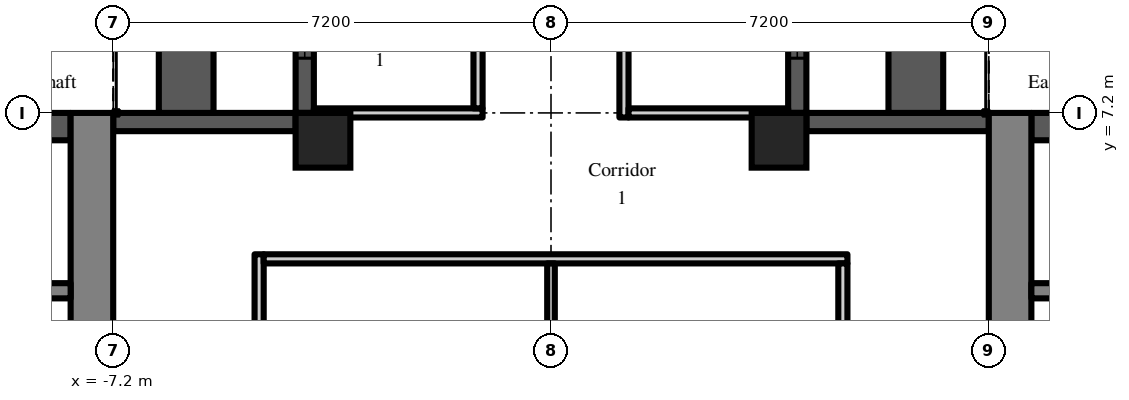
"""IFC4 building model, lengths in metres.
Left out: names, types, materials, properties, quantities, classifications, styles, units other than length and angle.
Written with IfcOpenShell. Run it as: python <this file> out.ifc"""

import sys

from ifc_helpers import new_model, si_unit, direction, frame, frame_2d, origin, origin_2d, place, context, subcontext, project, spatial, rectangle, extrude, element, fill, save


model = new_model("IFC4")
c1 = context("Model", 3, precision=1e-05, world=origin(), true_north=direction((0.0, 1.0)))
c2 = subcontext(c1, "Body", "Model", "MODEL_VIEW")
j1 = project(units=[si_unit("LENGTHUNIT", "METRE"), si_unit("PLANEANGLEUNIT", "RADIAN")], contexts=[c1])
p1 = place(None, origin())
s1 = spatial("IfcSite", under=j1, at=p1, CompositionType="ELEMENT")
p2 = place(p1, origin())
s2 = spatial("IfcBuilding", under=s1, at=p2, CompositionType="ELEMENT")
p3 = place(p2, frame((0.0, 0.0, 159.3)))
s3 = spatial("IfcBuildingStorey", under=s2, at=p3, CompositionType="ELEMENT", Elevation=159.3)
for number, where, z_axis, x_axis in (
    (1, (-3.75, 6.75, 0.0), (0.0, 0.0, 1.0), (1.0, 0.0, 0.0)),
    (2, (3.75, 6.75, 0.0), (0.0, 0.0, 1.0), (1.0, 0.0, 0.0)),
):
    element("IfcColumn", number, at=place(p3, frame(where, z_axis=z_axis, x_axis=x_axis)), inside=s3, PredefinedType="COLUMN", context=c2, shape_type="SweptSolid", body=[
        extrude(rectangle(XDim=0.9, YDim=0.9, at=origin_2d()), origin(), (0.0, 0.0, 1.0), 3.0),
    ])
p4 = place(p3, frame((7.2, 7.05, 0.0), z_axis=(0.0, 0.0, 1.0), x_axis=(-1.0, 0.0, 0.0)))
e3 = element("IfcWall", 3, at=p4, inside=s3, PredefinedType="SOLIDWALL", context=c2, shape_type="SweptSolid", body=[
    extrude(rectangle(XDim=3.0, YDim=0.3, at=frame_2d((1.5, 0.0))), origin(), (0.0, 0.0, 1.0), 2.55),
])
p5 = place(p3, frame((4.05, 7.2, 0.0), z_axis=(0.0, 0.0, 1.0), x_axis=(0.0, 1.0, 0.0)))
e4 = element("IfcWall", 4, at=p5, inside=s3, PredefinedType="SOLIDWALL", context=c2, shape_type="SweptSolid", body=[
    extrude(rectangle(XDim=7.2, YDim=0.3, at=frame_2d((3.6, 0.0))), origin(), (0.0, 0.0, 1.0), 2.55),
])
p6 = place(p5, frame((3.0, 0.0, 0.0)))
e5 = element("IfcOpeningElement", 5, at=p6, cuts=e4, PredefinedType="OPENING", context=c2, shape_type="SweptSolid", body=[
    extrude(rectangle(XDim=1.2, YDim=2.05, at=frame_2d((0.6, 1.025))), frame((0.0, 0.16, 0.0), z_axis=(0.0, -1.0, 0.0), x_axis=(1.0, 0.0, 0.0)), (0.0, 0.0, 1.0), 0.32),
])
p7 = place(p5, frame((0.9, 0.0, 0.2)))
e6 = element("IfcOpeningElement", 6, at=p7, cuts=e4, PredefinedType="OPENING", context=c2, shape_type="SweptSolid", body=[
    extrude(rectangle(XDim=1.8, YDim=1.85, at=frame_2d((0.9, 0.925))), frame((0.0, 0.16, 0.0), z_axis=(0.0, -1.0, 0.0), x_axis=(1.0, 0.0, 0.0)), (0.0, 0.0, 1.0), 0.32),
])
p8 = place(p5, frame((4.5, 0.0, 0.2)))
e7 = element("IfcOpeningElement", 7, at=p8, cuts=e4, PredefinedType="OPENING", context=c2, shape_type="SweptSolid", body=[
    extrude(rectangle(XDim=1.8, YDim=1.85, at=frame_2d((0.9, 0.925))), frame((0.0, 0.16, 0.0), z_axis=(0.0, -1.0, 0.0), x_axis=(1.0, 0.0, 0.0)), (0.0, 0.0, 1.0), 0.32),
])
p9 = place(p3, frame((-4.05, 14.4, 0.0), z_axis=(0.0, 0.0, 1.0), x_axis=(0.0, -1.0, 0.0)))
e8 = element("IfcWall", 8, at=p9, inside=s3, PredefinedType="SOLIDWALL", context=c2, shape_type="SweptSolid", body=[
    extrude(rectangle(XDim=7.2, YDim=0.3, at=frame_2d((3.6, 0.0))), origin(), (0.0, 0.0, 1.0), 2.55),
])
p10 = place(p9, frame((3.0, 0.0, 0.0)))
e9 = element("IfcOpeningElement", 9, at=p10, cuts=e8, PredefinedType="OPENING", context=c2, shape_type="SweptSolid", body=[
    extrude(rectangle(XDim=1.2, YDim=2.05, at=frame_2d((0.6, 1.025))), frame((0.0, 0.16, 0.0), z_axis=(0.0, -1.0, 0.0), x_axis=(1.0, 0.0, 0.0)), (0.0, 0.0, 1.0), 0.32),
])
p11 = place(p9, frame((0.9, 0.0, 0.2)))
e10 = element("IfcOpeningElement", 10, at=p11, cuts=e8, PredefinedType="OPENING", context=c2, shape_type="SweptSolid", body=[
    extrude(rectangle(XDim=1.8, YDim=1.85, at=frame_2d((0.9, 0.925))), frame((0.0, 0.16, 0.0), z_axis=(0.0, -1.0, 0.0), x_axis=(1.0, 0.0, 0.0)), (0.0, 0.0, 1.0), 0.32),
])
p12 = place(p9, frame((4.5, 0.0, 0.2)))
e11 = element("IfcOpeningElement", 11, at=p12, cuts=e8, PredefinedType="OPENING", context=c2, shape_type="SweptSolid", body=[
    extrude(rectangle(XDim=1.8, YDim=1.85, at=frame_2d((0.9, 0.925))), frame((0.0, 0.16, 0.0), z_axis=(0.0, -1.0, 0.0), x_axis=(1.0, 0.0, 0.0)), (0.0, 0.0, 1.0), 0.32),
])
p13 = place(p3, frame((-4.2, 7.05, 0.0), z_axis=(0.0, 0.0, 1.0), x_axis=(-1.0, 0.0, 0.0)))
e12 = element("IfcWall", 12, at=p13, inside=s3, PredefinedType="SOLIDWALL", context=c2, shape_type="SweptSolid", body=[
    extrude(rectangle(XDim=3.0, YDim=0.3, at=frame_2d((1.5, 0.0))), origin(), (0.0, 0.0, 1.0), 2.55),
])
for number, where, z_axis, x_axis in (
    (13, (6.0, 7.2, 0.0), (0.0, 0.0, 1.0), (0.0, 1.0, 0.0)),
    (14, (-6.0, 7.2, 0.0), (0.0, 0.0, 1.0), (0.0, 1.0, 0.0)),
):
    element("IfcWall", number, at=place(p3, frame(where, z_axis=z_axis, x_axis=x_axis)), inside=s3, PredefinedType="PARAPET", context=c2, shape_type="SweptSolid", body=[
        extrude(rectangle(XDim=7.2, YDim=0.9, at=frame_2d((3.6, 0.0))), origin(), (0.0, 0.0, 1.0), 0.8),
    ])
p14 = place(p3, frame((7.55, -7.2, 0.0), z_axis=(0.0, 0.0, 1.0), x_axis=(0.0, 1.0, 0.0)))
e15 = element("IfcWall", 15, at=p14, inside=s3, PredefinedType="SHEAR", context=c2, shape_type="SweptSolid", body=[
    extrude(rectangle(XDim=14.4, YDim=0.7, at=frame_2d((7.2, 0.0))), origin(), (0.0, 0.0, 1.0), 2.55),
])
p15 = place(p14, frame((6.0, 0.0, 0.0)))
e16 = element("IfcOpeningElement", 16, at=p15, cuts=e15, PredefinedType="OPENING", context=c2, shape_type="SweptSolid", body=[
    extrude(rectangle(XDim=2.4, YDim=2.2, at=frame_2d((1.2, 1.1))), frame((0.0, 0.36, 0.0), z_axis=(0.0, -1.0, 0.0), x_axis=(1.0, 0.0, 0.0)), (0.0, 0.0, 1.0), 0.72),
])
p16 = place(p3, frame((7.9, 6.975, 0.0), z_axis=(0.0, 0.0, 1.0), x_axis=(1.0, 0.0, 0.0)))
e17 = element("IfcWall", 17, at=p16, inside=s3, PredefinedType="SHEAR", context=c2, shape_type="SweptSolid", body=[
    extrude(rectangle(XDim=12.95, YDim=0.45, at=frame_2d((6.475, 0.0))), origin(), (0.0, 0.0, 1.0), 2.55),
])
p17 = place(p3, frame((7.9, 4.275, 0.0), z_axis=(0.0, 0.0, 1.0), x_axis=(1.0, 0.0, 0.0)))
e18 = element("IfcWall", 18, at=p17, inside=s3, PredefinedType="SHEAR", context=c2, shape_type="SweptSolid", body=[
    extrude(rectangle(XDim=1.95, YDim=0.25, at=frame_2d((0.975, 0.0))), origin(), (0.0, 0.0, 1.0), 2.55),
])
p18 = place(p3, frame((-7.55, -7.2, 0.0), z_axis=(0.0, 0.0, 1.0), x_axis=(0.0, 1.0, 0.0)))
e19 = element("IfcWall", 19, at=p18, inside=s3, PredefinedType="SHEAR", context=c2, shape_type="SweptSolid", body=[
    extrude(rectangle(XDim=14.4, YDim=0.7, at=frame_2d((7.2, 0.0))), origin(), (0.0, 0.0, 1.0), 2.55),
])
p19 = place(p18, frame((6.0, 0.0, 0.0)))
e20 = element("IfcOpeningElement", 20, at=p19, cuts=e19, PredefinedType="OPENING", context=c2, shape_type="SweptSolid", body=[
    extrude(rectangle(XDim=2.4, YDim=2.2, at=frame_2d((1.2, 1.1))), frame((0.0, 0.36, 0.0), z_axis=(0.0, -1.0, 0.0), x_axis=(1.0, 0.0, 0.0)), (0.0, 0.0, 1.0), 0.72),
])
p20 = place(p3, frame((-7.9, 6.975, 0.0), z_axis=(0.0, 0.0, 1.0), x_axis=(-1.0, 0.0, 0.0)))
e21 = element("IfcWall", 21, at=p20, inside=s3, PredefinedType="SHEAR", context=c2, shape_type="SweptSolid", body=[
    extrude(rectangle(XDim=12.95, YDim=0.45, at=frame_2d((6.475, 0.0))), origin(), (0.0, 0.0, 1.0), 2.55),
])
p21 = place(p3, frame((-7.9, 4.275, 0.0), z_axis=(0.0, 0.0, 1.0), x_axis=(-1.0, 0.0, 0.0)))
e22 = element("IfcWall", 22, at=p21, inside=s3, PredefinedType="SHEAR", context=c2, shape_type="SweptSolid", body=[
    extrude(rectangle(XDim=1.95, YDim=0.25, at=frame_2d((0.975, 0.0))), origin(), (0.0, 0.0, 1.0), 2.55),
])
p22 = place(p3, frame((-4.8, -4.875, 0.0), z_axis=(0.0, 0.0, 1.0), x_axis=(0.0, 1.0, 0.0)))
e23 = element("IfcWall", 23, at=p22, inside=s3, PredefinedType="PARTITIONING", context=c2, shape_type="SweptSolid", body=[
    extrude(rectangle(XDim=9.75, YDim=0.15, at=frame_2d((4.875, 0.0))), origin(), (0.0, 0.0, 1.0), 2.55),
])
p23 = place(p22, frame((5.575, 0.0, 0.0)))
e24 = element("IfcOpeningElement", 24, at=p23, cuts=e23, PredefinedType="OPENING", context=c2, shape_type="SweptSolid", body=[
    extrude(rectangle(XDim=1.0, YDim=2.1, at=frame_2d((0.5, 1.05))), frame((0.0, 0.085, 0.0), z_axis=(0.0, -1.0, 0.0), x_axis=(1.0, 0.0, 0.0)), (0.0, 0.0, 1.0), 0.17),
])
p24 = place(p3, frame((-4.725, 4.8, 0.0), z_axis=(0.0, 0.0, 1.0), x_axis=(1.0, 0.0, 0.0)))
e25 = element("IfcWall", 25, at=p24, inside=s3, PredefinedType="PARTITIONING", context=c2, shape_type="SweptSolid", body=[
    extrude(rectangle(XDim=9.6, YDim=0.15, at=frame_2d((4.8, 0.0))), origin(), (0.0, 0.0, 1.0), 2.55),
])
p25 = place(p3, frame((-3.9, 7.2, 0.0), z_axis=(0.0, 0.0, 1.0), x_axis=(1.0, 0.0, 0.0)))
e26 = element("IfcWall", 26, at=p25, inside=s3, PredefinedType="PARTITIONING", context=c2, shape_type="SweptSolid", body=[
    extrude(rectangle(XDim=2.775, YDim=0.15, at=frame_2d((1.387, 0.0))), origin(), (0.0, 0.0, 1.0), 2.55),
])
p26 = place(p3, frame((-1.2, 7.275, 0.0), z_axis=(0.0, 0.0, 1.0), x_axis=(0.0, 1.0, 0.0)))
e27 = element("IfcWall", 27, at=p26, inside=s3, PredefinedType="PARTITIONING", context=c2, shape_type="SweptSolid", body=[
    extrude(rectangle(XDim=14.025, YDim=0.15, at=frame_2d((7.013, 0.0))), origin(), (0.0, 0.0, 1.0), 2.55),
])
p27 = place(p26, frame((5.275, 0.0, 0.0)))
e28 = element("IfcOpeningElement", 28, at=p27, cuts=e27, PredefinedType="OPENING", context=c2, shape_type="SweptSolid", body=[
    extrude(rectangle(XDim=0.9, YDim=2.1, at=frame_2d((0.45, 1.05))), frame((0.0, 0.085, 0.0), z_axis=(0.0, -1.0, 0.0), x_axis=(1.0, 0.0, 0.0)), (0.0, 0.0, 1.0), 0.17),
])
p28 = place(p26, frame((1.675, 0.0, 0.0)))
e29 = element("IfcOpeningElement", 29, at=p28, cuts=e27, PredefinedType="OPENING", context=c2, shape_type="SweptSolid", body=[
    extrude(rectangle(XDim=0.9, YDim=2.1, at=frame_2d((0.45, 1.05))), frame((0.0, 0.085, 0.0), z_axis=(0.0, -1.0, 0.0), x_axis=(1.0, 0.0, 0.0)), (0.0, 0.0, 1.0), 0.17),
])
p29 = place(p26, frame((7.575, 0.0, 0.0)))
e30 = element("IfcOpeningElement", 30, at=p29, cuts=e27, PredefinedType="OPENING", context=c2, shape_type="SweptSolid", body=[
    extrude(rectangle(XDim=0.9, YDim=2.1, at=frame_2d((0.45, 1.05))), frame((0.0, 0.085, 0.0), z_axis=(0.0, -1.0, 0.0), x_axis=(1.0, 0.0, 0.0)), (0.0, 0.0, 1.0), 0.17),
])
p30 = place(p26, frame((9.375, 0.0, 0.0)))
e31 = element("IfcOpeningElement", 31, at=p30, cuts=e27, PredefinedType="OPENING", context=c2, shape_type="SweptSolid", body=[
    extrude(rectangle(XDim=0.9, YDim=2.1, at=frame_2d((0.45, 1.05))), frame((0.0, 0.085, 0.0), z_axis=(0.0, -1.0, 0.0), x_axis=(1.0, 0.0, 0.0)), (0.0, 0.0, 1.0), 0.17),
])
p31 = place(p26, frame((11.175, 0.0, 0.0)))
e32 = element("IfcOpeningElement", 32, at=p31, cuts=e27, PredefinedType="OPENING", context=c2, shape_type="SweptSolid", body=[
    extrude(rectangle(XDim=0.9, YDim=2.1, at=frame_2d((0.45, 1.05))), frame((0.0, 0.085, 0.0), z_axis=(0.0, -1.0, 0.0), x_axis=(1.0, 0.0, 0.0)), (0.0, 0.0, 1.0), 0.17),
])
p32 = place(p26, frame((12.825, 0.0, 0.0)))
e33 = element("IfcOpeningElement", 33, at=p32, cuts=e27, PredefinedType="OPENING", context=c2, shape_type="SweptSolid", body=[
    extrude(rectangle(XDim=0.9, YDim=2.1, at=frame_2d((0.45, 1.05))), frame((0.0, 0.085, 0.0), z_axis=(0.0, -1.0, 0.0), x_axis=(1.0, 0.0, 0.0)), (0.0, 0.0, 1.0), 0.17),
])
p33 = place(p3, frame((0.0, -2.325, 0.0), z_axis=(0.0, 0.0, 1.0), x_axis=(0.0, 1.0, 0.0)))
e34 = element("IfcWall", 34, at=p33, inside=s3, PredefinedType="PARTITIONING", context=c2, shape_type="SweptSolid", body=[
    extrude(rectangle(XDim=7.05, YDim=0.125, at=frame_2d((3.525, 0.0))), origin(), (0.0, 0.0, 1.0), 2.55),
])
p34 = place(p3, frame((1.2, 7.125, 0.0), z_axis=(0.0, 0.0, 1.0), x_axis=(0.0, 1.0, 0.0)))
e35 = element("IfcWall", 35, at=p34, inside=s3, PredefinedType="PARTITIONING", context=c2, shape_type="SweptSolid", body=[
    extrude(rectangle(XDim=14.175, YDim=0.15, at=frame_2d((7.087, 0.0))), origin(), (0.0, 0.0, 1.0), 2.55),
])
p35 = place(p34, frame((1.425, 0.0, 0.0)))
e36 = element("IfcOpeningElement", 36, at=p35, cuts=e35, PredefinedType="OPENING", context=c2, shape_type="SweptSolid", body=[
    extrude(rectangle(XDim=0.9, YDim=2.1, at=frame_2d((0.45, 1.05))), frame((0.0, 0.085, 0.0), z_axis=(0.0, -1.0, 0.0), x_axis=(1.0, 0.0, 0.0)), (0.0, 0.0, 1.0), 0.17),
])
p36 = place(p34, frame((7.725, 0.0, 0.0)))
e37 = element("IfcOpeningElement", 37, at=p36, cuts=e35, PredefinedType="OPENING", context=c2, shape_type="SweptSolid", body=[
    extrude(rectangle(XDim=0.9, YDim=2.1, at=frame_2d((0.45, 1.05))), frame((0.0, 0.085, 0.0), z_axis=(0.0, -1.0, 0.0), x_axis=(1.0, 0.0, 0.0)), (0.0, 0.0, 1.0), 0.17),
])
p37 = place(p34, frame((9.525, 0.0, 0.0)))
e38 = element("IfcOpeningElement", 38, at=p37, cuts=e35, PredefinedType="OPENING", context=c2, shape_type="SweptSolid", body=[
    extrude(rectangle(XDim=0.9, YDim=2.1, at=frame_2d((0.45, 1.05))), frame((0.0, 0.085, 0.0), z_axis=(0.0, -1.0, 0.0), x_axis=(1.0, 0.0, 0.0)), (0.0, 0.0, 1.0), 0.17),
])
p38 = place(p34, frame((11.325, 0.0, 0.0)))
e39 = element("IfcOpeningElement", 39, at=p38, cuts=e35, PredefinedType="OPENING", context=c2, shape_type="SweptSolid", body=[
    extrude(rectangle(XDim=0.9, YDim=2.1, at=frame_2d((0.45, 1.05))), frame((0.0, 0.085, 0.0), z_axis=(0.0, -1.0, 0.0), x_axis=(1.0, 0.0, 0.0)), (0.0, 0.0, 1.0), 0.17),
])
p39 = place(p34, frame((12.975, 0.0, 0.0)))
e40 = element("IfcOpeningElement", 40, at=p39, cuts=e35, PredefinedType="OPENING", context=c2, shape_type="SweptSolid", body=[
    extrude(rectangle(XDim=0.9, YDim=2.1, at=frame_2d((0.45, 1.05))), frame((0.0, 0.085, 0.0), z_axis=(0.0, -1.0, 0.0), x_axis=(1.0, 0.0, 0.0)), (0.0, 0.0, 1.0), 0.17),
])
p40 = place(p3, frame((1.275, 7.2, 0.0), z_axis=(0.0, 0.0, 1.0), x_axis=(1.0, 0.0, 0.0)))
e41 = element("IfcWall", 41, at=p40, inside=s3, PredefinedType="PARTITIONING", context=c2, shape_type="SweptSolid", body=[
    extrude(rectangle(XDim=2.625, YDim=0.15, at=frame_2d((1.312, 0.0))), origin(), (0.0, 0.0, 1.0), 2.55),
])
p41 = place(p3, frame((4.8, -4.725, 0.0), z_axis=(0.0, 0.0, 1.0), x_axis=(0.0, 1.0, 0.0)))
e42 = element("IfcWall", 42, at=p41, inside=s3, PredefinedType="PARTITIONING", context=c2, shape_type="SweptSolid", body=[
    extrude(rectangle(XDim=9.45, YDim=0.15, at=frame_2d((4.725, 0.0))), origin(), (0.0, 0.0, 1.0), 2.55),
])
p42 = place(p41, frame((5.025, 0.0, 0.0)))
e43 = element("IfcOpeningElement", 43, at=p42, cuts=e42, PredefinedType="OPENING", context=c2, shape_type="SweptSolid", body=[
    extrude(rectangle(XDim=1.8, YDim=2.1, at=frame_2d((0.9, 1.05))), frame((0.0, 0.085, 0.0), z_axis=(0.0, -1.0, 0.0), x_axis=(1.0, 0.0, 0.0)), (0.0, 0.0, 1.0), 0.17),
])
p43 = place(p7, origin())
e44 = element("IfcWindow", 44, at=p43, inside=s3, PartitioningType="SINGLE_PANEL", PredefinedType="WINDOW", context=c2, shape_type="SweptSolid", body=[
    extrude(rectangle(XDim=1.8, YDim=1.85, at=frame_2d((0.9, 0.925))), frame((0.0, 0.03, 0.0), z_axis=(0.0, -1.0, 0.0), x_axis=(1.0, 0.0, 0.0)), (0.0, 0.0, 1.0), 0.06),
])
fill(e6, e44)
p44 = place(p12, origin())
e45 = element("IfcWindow", 45, at=p44, inside=s3, PartitioningType="SINGLE_PANEL", PredefinedType="WINDOW", context=c2, shape_type="SweptSolid", body=[
    extrude(rectangle(XDim=1.8, YDim=1.85, at=frame_2d((0.9, 0.925))), frame((0.0, 0.03, 0.0), z_axis=(0.0, -1.0, 0.0), x_axis=(1.0, 0.0, 0.0)), (0.0, 0.0, 1.0), 0.06),
])
fill(e11, e45)
save(model, sys.argv[1])
